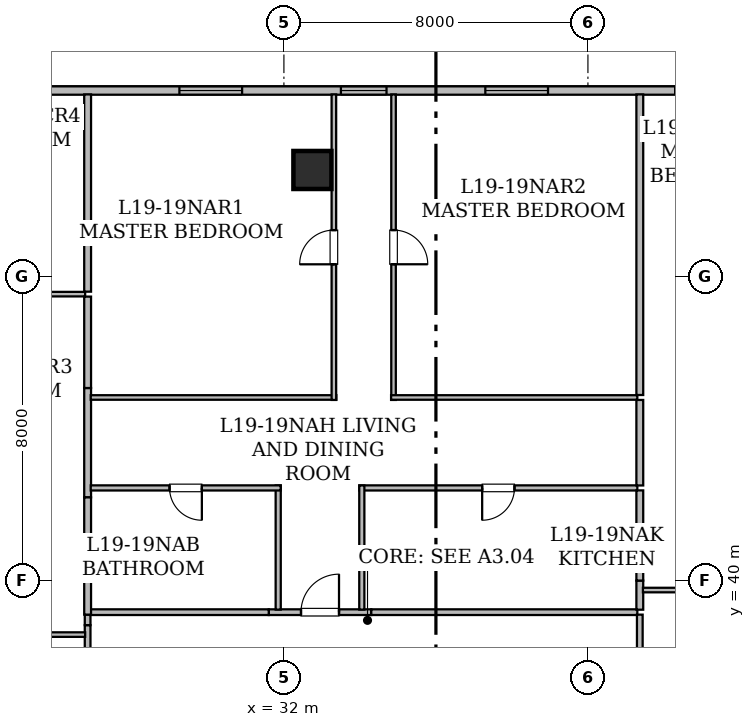
"""IFC4 building model, lengths in metres.
Left out: names, types, materials, properties, quantities, classifications, styles, units other than length and angle.
Written with IfcOpenShell. Run it as: python <this file> out.ifc"""

import sys

from ifc_helpers import new_model, si_unit, direction, frame, frame_2d, origin, origin_2d, place, context, subcontext, project, spatial, rectangle, hollow_rectangle, extrude, element, fill, save


model = new_model("IFC4")
c1 = context("Model", 3, precision=1e-05, world=origin(), true_north=direction((0.0, 1.0)))
c2 = subcontext(c1, "Body", "Model", "MODEL_VIEW")
j1 = project(units=[si_unit("LENGTHUNIT", "METRE"), si_unit("PLANEANGLEUNIT", "RADIAN")], contexts=[c1])
p1 = place(None, origin())
s1 = spatial("IfcSite", under=j1, at=p1, CompositionType="ELEMENT")
p2 = place(p1, origin())
s2 = spatial("IfcBuilding", under=s1, at=p2, CompositionType="ELEMENT")
p3 = place(p2, frame((0.0, 0.0, 77.1)))
s3 = spatial("IfcBuildingStorey", under=s2, at=p3, CompositionType="ELEMENT", Elevation=77.1)
p4 = place(p3, frame((32.75, 50.8, 0.0), z_axis=(0.0, 0.0, 1.0), x_axis=(1.0, 0.0, 0.0)))
e1 = element("IfcColumn", 1, at=p4, inside=s3, PredefinedType="COLUMN", context=c2, shape_type="SweptSolid", body=[
    extrude(hollow_rectangle(XDim=1.0, YDim=1.0, WallThickness=0.05, at=origin_2d()), origin(), (0.0, 0.0, 1.0), 3.65),
])
p5 = place(p3, frame((8.315, 52.89, 0.0), z_axis=(0.0, 0.0, 1.0), x_axis=(1.0, 0.0, 0.0)))
e2 = element("IfcWall", 2, at=p5, inside=s3, PredefinedType="STANDARD", context=c2, shape_type="SweptSolid", body=[
    extrude(rectangle(XDim=37.439, YDim=0.22, at=frame_2d((18.719, 0.0))), origin(), (0.0, 0.0, 1.0), 3.43),
])
p6 = place(p5, frame((5.093, 0.0, 0.85)))
e3 = element("IfcOpeningElement", 3, at=p6, cuts=e2, PredefinedType="OPENING", context=c2, shape_type="SweptSolid", body=[
    extrude(rectangle(XDim=1.65, YDim=1.55, at=frame_2d((0.825, 0.775))), frame((0.0, 0.12, 0.0), z_axis=(0.0, -1.0, 0.0), x_axis=(1.0, 0.0, 0.0)), (0.0, 0.0, 1.0), 0.24),
])
p7 = place(p5, frame((13.055, 0.0, 0.8)))
e4 = element("IfcOpeningElement", 4, at=p7, cuts=e2, PredefinedType="OPENING", context=c2, shape_type="SweptSolid", body=[
    extrude(rectangle(XDim=1.2, YDim=1.5, at=frame_2d((0.6, 0.75))), frame((0.0, 0.12, 0.0), z_axis=(0.0, -1.0, 0.0), x_axis=(1.0, 0.0, 0.0)), (0.0, 0.0, 1.0), 0.24),
])
p8 = place(p5, frame((10.005, 0.0, 0.85)))
e5 = element("IfcOpeningElement", 5, at=p8, cuts=e2, PredefinedType="OPENING", context=c2, shape_type="SweptSolid", body=[
    extrude(rectangle(XDim=1.65, YDim=1.55, at=frame_2d((0.825, 0.775))), frame((0.0, 0.12, 0.0), z_axis=(0.0, -1.0, 0.0), x_axis=(1.0, 0.0, 0.0)), (0.0, 0.0, 1.0), 0.24),
])
p9 = place(p5, frame((15.655, 0.0, 0.85)))
e6 = element("IfcOpeningElement", 6, at=p9, cuts=e2, PredefinedType="OPENING", context=c2, shape_type="SweptSolid", body=[
    extrude(rectangle(XDim=1.65, YDim=1.55, at=frame_2d((0.825, 0.775))), frame((0.0, 0.12, 0.0), z_axis=(0.0, -1.0, 0.0), x_axis=(1.0, 0.0, 0.0)), (0.0, 0.0, 1.0), 0.24),
])
p10 = place(p5, frame((25.185, 0.0, 0.8)))
e7 = element("IfcOpeningElement", 7, at=p10, cuts=e2, PredefinedType="OPENING", context=c2, shape_type="SweptSolid", body=[
    extrude(rectangle(XDim=1.2, YDim=1.5, at=frame_2d((0.6, 0.75))), frame((0.0, 0.12, 0.0), z_axis=(0.0, -1.0, 0.0), x_axis=(1.0, 0.0, 0.0)), (0.0, 0.0, 1.0), 0.24),
])
p11 = place(p5, frame((20.935, 0.0, 0.85)))
e8 = element("IfcOpeningElement", 8, at=p11, cuts=e2, PredefinedType="OPENING", context=c2, shape_type="SweptSolid", body=[
    extrude(rectangle(XDim=1.65, YDim=1.55, at=frame_2d((0.825, 0.775))), frame((0.0, 0.12, 0.0), z_axis=(0.0, -1.0, 0.0), x_axis=(1.0, 0.0, 0.0)), (0.0, 0.0, 1.0), 0.24),
])
p12 = place(p5, frame((28.985, 0.0, 0.85)))
e9 = element("IfcOpeningElement", 9, at=p12, cuts=e2, PredefinedType="OPENING", context=c2, shape_type="SweptSolid", body=[
    extrude(rectangle(XDim=1.65, YDim=1.55, at=frame_2d((0.825, 0.775))), frame((0.0, 0.12, 0.0), z_axis=(0.0, -1.0, 0.0), x_axis=(1.0, 0.0, 0.0)), (0.0, 0.0, 1.0), 0.24),
])
p13 = place(p5, frame((33.98, 0.0, 0.85)))
e10 = element("IfcOpeningElement", 10, at=p13, cuts=e2, PredefinedType="OPENING", context=c2, shape_type="SweptSolid", body=[
    extrude(rectangle(XDim=1.65, YDim=1.55, at=frame_2d((0.825, 0.775))), frame((0.0, 0.12, 0.0), z_axis=(0.0, -1.0, 0.0), x_axis=(1.0, 0.0, 0.0)), (0.0, 0.0, 1.0), 0.24),
])
p14 = place(p3, frame((26.835, 35.946, 0.0), z_axis=(0.0, 0.0, 1.0), x_axis=(0.0, 1.0, 0.0)))
e11 = element("IfcWall", 11, at=p14, inside=s3, PredefinedType="STANDARD", context=c2, shape_type="SweptSolid", body=[
    extrude(rectangle(XDim=2.878, YDim=0.15, at=frame_2d((1.439, 0.0))), origin(), (0.0, 0.0, 1.0), 2.647),
])
p15 = place(p14, frame((0.939, 0.0, 0.0)))
e12 = element("IfcOpeningElement", 12, at=p15, cuts=e11, PredefinedType="OPENING", context=c2, shape_type="SweptSolid", body=[
    extrude(rectangle(XDim=1.0, YDim=2.15, at=frame_2d((0.5, 1.075))), frame((0.0, 0.085, 0.0), z_axis=(0.0, -1.0, 0.0), x_axis=(1.0, 0.0, 0.0)), (0.0, 0.0, 1.0), 0.17),
])
p16 = place(p3, frame((26.835, 38.824, 0.0), z_axis=(0.0, 0.0, 1.0), x_axis=(0.0, 1.0, 0.0)))
e13 = element("IfcWall", 13, at=p16, inside=s3, PredefinedType="STANDARD", context=c2, shape_type="SweptSolid", body=[
    extrude(rectangle(XDim=0.276, YDim=0.15, at=frame_2d((0.138, 0.0))), origin(), (0.0, 0.0, 1.0), 3.43),
])
p17 = place(p3, frame((31.601, 39.165, 0.0), z_axis=(0.0, 0.0, 1.0), x_axis=(1.0, 0.0, 0.0)))
e14 = element("IfcWall", 14, at=p17, inside=s3, PredefinedType="STANDARD", context=c2, shape_type="SweptSolid", body=[
    extrude(rectangle(XDim=2.698, YDim=0.15, at=frame_2d((1.349, 0.0))), origin(), (0.0, 0.0, 1.0), 3.43),
])
p18 = place(p17, frame((0.849, 0.0, 0.0)))
e15 = element("IfcOpeningElement", 15, at=p18, cuts=e14, PredefinedType="OPENING", context=c2, shape_type="SweptSolid", body=[
    extrude(rectangle(XDim=1.0, YDim=2.15, at=frame_2d((0.5, 1.075))), frame((0.0, 0.085, 0.0), z_axis=(0.0, -1.0, 0.0), x_axis=(1.0, 0.0, 0.0)), (0.0, 0.0, 1.0), 0.17),
])
p19 = place(p3, frame((26.9, 39.165, 0.0), z_axis=(0.0, 0.0, 1.0), x_axis=(1.0, 0.0, 0.0)))
e16 = element("IfcWall", 16, at=p19, inside=s3, PredefinedType="STANDARD", context=c2, shape_type="SweptSolid", body=[
    extrude(rectangle(XDim=4.701, YDim=0.15, at=frame_2d((2.351, 0.0))), origin(), (0.0, 0.0, 1.0), 2.647),
])
p20 = place(p3, frame((34.299, 39.165, 0.0), z_axis=(0.0, 0.0, 1.0), x_axis=(1.0, 0.0, 0.0)))
e17 = element("IfcWall", 17, at=p20, inside=s3, PredefinedType="STANDARD", context=c2, shape_type="SweptSolid", body=[
    extrude(rectangle(XDim=7.001, YDim=0.15, at=frame_2d((3.5, 0.0))), origin(), (0.0, 0.0, 1.0), 3.43),
])
p21 = place(p3, frame((41.365, 39.1, 0.0), z_axis=(0.0, 0.0, 1.0), x_axis=(0.0, -1.0, 0.0)))
e18 = element("IfcWall", 18, at=p21, inside=s3, PredefinedType="STANDARD", context=c2, shape_type="SweptSolid", body=[
    extrude(rectangle(XDim=1.982, YDim=0.15, at=frame_2d((0.991, 0.0))), origin(), (0.0, 0.0, 1.0), 2.647),
])
p22 = place(p3, frame((22.69, 38.575, 0.0), z_axis=(0.0, 0.0, 1.0), x_axis=(1.0, 0.0, 0.0)))
e19 = element("IfcWall", 19, at=p22, inside=s3, PredefinedType="PARTITIONING", context=c2, shape_type="SweptSolid", body=[
    extrude(rectangle(XDim=4.08, YDim=0.12, at=frame_2d((2.04, 0.0))), origin(), (0.0, 0.0, 1.0), 3.43),
])
p23 = place(p3, frame((22.809, 47.533, 0.0), z_axis=(0.0, 0.0, 1.0), x_axis=(1.0, 0.0, 0.0)))
e20 = element("IfcWall", 20, at=p23, inside=s3, PredefinedType="PARTITIONING", context=c2, shape_type="SweptSolid", body=[
    extrude(rectangle(XDim=3.961, YDim=0.12, at=frame_2d((1.98, 0.0))), origin(), (0.0, 0.0, 1.0), 3.43),
])
p24 = place(p3, frame((26.835, 45.063, 0.0), z_axis=(0.0, 0.0, 1.0), x_axis=(0.0, -1.0, 0.0)))
e21 = element("IfcWall", 21, at=p24, inside=s3, PredefinedType="STANDARD", context=c2, shape_type="SweptSolid", body=[
    extrude(rectangle(XDim=2.878, YDim=0.18, at=frame_2d((1.439, 0.0))), origin(), (0.0, 0.0, 1.0), 2.961),
])
p25 = place(p3, frame((26.835, 42.185, 0.0), z_axis=(0.0, 0.0, 1.0), x_axis=(0.0, -1.0, 0.0)))
e22 = element("IfcWall", 22, at=p25, inside=s3, PredefinedType="STANDARD", context=c2, shape_type="SweptSolid", body=[
    extrude(rectangle(XDim=3.085, YDim=0.18, at=frame_2d((1.542, 0.0))), origin(), (0.0, 0.0, 1.0), 3.43),
])
p26 = place(p3, frame((26.835, 47.468, 0.0), z_axis=(0.0, 0.0, 1.0), x_axis=(0.0, -1.0, 0.0)))
e23 = element("IfcWall", 23, at=p26, inside=s3, PredefinedType="STANDARD", context=c2, shape_type="SweptSolid", body=[
    extrude(rectangle(XDim=2.405, YDim=0.18, at=frame_2d((1.203, 0.0))), origin(), (0.0, 0.0, 1.0), 3.43),
])
p27 = place(p3, frame((26.835, 52.788, 0.0), z_axis=(0.0, 0.0, 1.0), x_axis=(0.0, -1.0, 0.0)))
e24 = element("IfcWall", 24, at=p27, inside=s3, PredefinedType="STANDARD", context=c2, shape_type="SweptSolid", body=[
    extrude(rectangle(XDim=5.19, YDim=0.18, at=frame_2d((2.595, 0.0))), origin(), (0.0, 0.0, 1.0), 2.803),
])
p28 = place(p3, frame((31.85, 39.232, 0.0), z_axis=(0.0, 0.0, 1.0), x_axis=(0.0, 1.0, 0.0)))
e25 = element("IfcWall", 25, at=p28, inside=s3, PredefinedType="PARTITIONING", context=c2, shape_type="SweptSolid", body=[
    extrude(rectangle(XDim=3.267, YDim=0.135, at=frame_2d((1.634, 0.0))), origin(), (0.0, 0.0, 1.0), 3.43),
])
p29 = place(p3, frame((31.915, 42.434, 0.0), z_axis=(0.0, 0.0, 1.0), x_axis=(-1.0, 0.0, 0.0)))
e26 = element("IfcWall", 26, at=p29, inside=s3, PredefinedType="PARTITIONING", context=c2, shape_type="SweptSolid", body=[
    extrude(rectangle(XDim=4.998, YDim=0.135, at=frame_2d((2.499, 0.0))), origin(), (0.0, 0.0, 1.0), 2.647),
])
p30 = place(p29, frame((2.074, 0.0, 0.0)))
e27 = element("IfcOpeningElement", 27, at=p30, cuts=e26, PredefinedType="OPENING", context=c2, shape_type="SweptSolid", body=[
    extrude(rectangle(XDim=0.85, YDim=2.1, at=frame_2d((0.425, 1.05))), frame((0.0, 0.077, 0.0), z_axis=(0.0, -1.0, 0.0), x_axis=(1.0, 0.0, 0.0)), (0.0, 0.0, 1.0), 0.155),
])
p31 = place(p3, frame((41.3, 42.434, 0.0), z_axis=(0.0, 0.0, 1.0), x_axis=(-1.0, 0.0, 0.0)))
e28 = element("IfcWall", 28, at=p31, inside=s3, PredefinedType="PARTITIONING", context=c2, shape_type="SweptSolid", body=[
    extrude(rectangle(XDim=7.315, YDim=0.135, at=frame_2d((3.657, 0.0))), origin(), (0.0, 0.0, 1.0), 2.961),
])
p32 = place(p31, frame((3.233, 0.0, 0.0)))
e29 = element("IfcOpeningElement", 29, at=p32, cuts=e28, PredefinedType="OPENING", context=c2, shape_type="SweptSolid", body=[
    extrude(rectangle(XDim=0.85, YDim=2.1, at=frame_2d((0.425, 1.05))), frame((0.0, 0.077, 0.0), z_axis=(0.0, -1.0, 0.0), x_axis=(1.0, 0.0, 0.0)), (0.0, 0.0, 1.0), 0.155),
])
p33 = place(p3, frame((34.05, 42.499, 0.0), z_axis=(0.0, 0.0, 1.0), x_axis=(0.0, -1.0, 0.0)))
e30 = element("IfcWall", 30, at=p33, inside=s3, PredefinedType="PARTITIONING", context=c2, shape_type="SweptSolid", body=[
    extrude(rectangle(XDim=3.267, YDim=0.135, at=frame_2d((1.634, 0.0))), origin(), (0.0, 0.0, 1.0), 3.43),
])
p34 = place(p3, frame((26.917, 44.814, 0.0), z_axis=(0.0, 0.0, 1.0), x_axis=(1.0, 0.0, 0.0)))
e31 = element("IfcWall", 31, at=p34, inside=s3, PredefinedType="PARTITIONING", context=c2, shape_type="SweptSolid", body=[
    extrude(rectangle(XDim=6.463, YDim=0.12, at=frame_2d((3.231, 0.0))), origin(), (0.0, 0.0, 1.0), 2.647),
])
p35 = place(p3, frame((33.315, 44.749, 0.0), z_axis=(0.0, 0.0, 1.0), x_axis=(0.0, 1.0, 0.0)))
e32 = element("IfcWall", 32, at=p35, inside=s3, PredefinedType="PARTITIONING", context=c2, shape_type="SweptSolid", body=[
    extrude(rectangle(XDim=8.039, YDim=0.12, at=frame_2d((4.02, 0.0))), origin(), (0.0, 0.0, 1.0), 2.803),
])
p36 = place(p35, frame((3.569, 0.0, 0.0)))
e33 = element("IfcOpeningElement", 33, at=p36, cuts=e32, PredefinedType="OPENING", context=c2, shape_type="SweptSolid", body=[
    extrude(rectangle(XDim=0.9, YDim=2.1, at=frame_2d((0.45, 1.05))), frame((0.0, 0.07, 0.0), z_axis=(0.0, -1.0, 0.0), x_axis=(1.0, 0.0, 0.0)), (0.0, 0.0, 1.0), 0.14),
])
p37 = place(p3, frame((34.885, 52.788, 0.0), z_axis=(0.0, 0.0, 1.0), x_axis=(0.0, -1.0, 0.0)))
e34 = element("IfcWall", 34, at=p37, inside=s3, PredefinedType="PARTITIONING", context=c2, shape_type="SweptSolid", body=[
    extrude(rectangle(XDim=8.039, YDim=0.12, at=frame_2d((4.02, 0.0))), origin(), (0.0, 0.0, 1.0), 2.803),
])
p38 = place(p37, frame((3.569, 0.0, 0.0)))
e35 = element("IfcOpeningElement", 35, at=p38, cuts=e34, PredefinedType="OPENING", context=c2, shape_type="SweptSolid", body=[
    extrude(rectangle(XDim=0.9, YDim=2.1, at=frame_2d((0.45, 1.05))), frame((0.0, 0.07, 0.0), z_axis=(0.0, -1.0, 0.0), x_axis=(1.0, 0.0, 0.0)), (0.0, 0.0, 1.0), 0.14),
])
p39 = place(p3, frame((34.82, 44.814, 0.0), z_axis=(0.0, 0.0, 1.0), x_axis=(1.0, 0.0, 0.0)))
e36 = element("IfcWall", 36, at=p39, inside=s3, PredefinedType="PARTITIONING", context=c2, shape_type="SweptSolid", body=[
    extrude(rectangle(XDim=6.48, YDim=0.12, at=frame_2d((3.24, 0.0))), origin(), (0.0, 0.0, 1.0), 3.43),
])
p40 = place(p3, frame((41.365, 44.749, 0.0), z_axis=(0.0, 0.0, 1.0), x_axis=(0.0, -1.0, 0.0)))
e37 = element("IfcWall", 37, at=p40, inside=s3, PredefinedType="STANDARD", context=c2, shape_type="SweptSolid", body=[
    extrude(rectangle(XDim=2.25, YDim=0.18, at=frame_2d((1.125, 0.0))), origin(), (0.0, 0.0, 1.0), 2.961),
])
p41 = place(p3, frame((41.365, 39.996, 0.0), z_axis=(0.0, 0.0, 1.0), x_axis=(0.0, -1.0, 0.0)))
e38 = element("IfcWall", 38, at=p41, inside=s3, PredefinedType="STANDARD", context=c2, shape_type="SweptSolid", body=[
    extrude(rectangle(XDim=0.766, YDim=0.18, at=frame_2d((0.383, 0.0))), origin(), (0.0, 0.0, 1.0), 3.43),
])
p42 = place(p3, frame((41.365, 42.369, 0.0), z_axis=(0.0, 0.0, 1.0), x_axis=(0.0, -1.0, 0.0)))
e39 = element("IfcWall", 39, at=p42, inside=s3, PredefinedType="STANDARD", context=c2, shape_type="SweptSolid", body=[
    extrude(rectangle(XDim=2.373, YDim=0.18, at=frame_2d((1.187, 0.0))), origin(), (0.0, 0.0, 1.0), 3.43),
])
p43 = place(p3, frame((41.365, 52.788, 0.0), z_axis=(0.0, 0.0, 1.0), x_axis=(0.0, -1.0, 0.0)))
e40 = element("IfcWall", 40, at=p43, inside=s3, PredefinedType="STANDARD", context=c2, shape_type="SweptSolid", body=[
    extrude(rectangle(XDim=7.909, YDim=0.18, at=frame_2d((3.955, 0.0))), origin(), (0.0, 0.0, 1.0), 2.803),
])
p44 = place(p3, frame((41.447, 39.747, 0.0), z_axis=(0.0, 0.0, 1.0), x_axis=(1.0, 0.0, 0.0)))
e41 = element("IfcWall", 41, at=p44, inside=s3, PredefinedType="PARTITIONING", context=c2, shape_type="SweptSolid", body=[
    extrude(rectangle(XDim=3.493, YDim=0.12, at=frame_2d((1.747, 0.0))), origin(), (0.0, 0.0, 1.0), 2.647),
])
p45 = place(p10, origin())
e42 = element("IfcWindow", 42, at=p45, inside=s3, PartitioningType="SINGLE_PANEL", PredefinedType="WINDOW", context=c2, shape_type="SweptSolid", body=[
    extrude(rectangle(XDim=1.2, YDim=1.5, at=frame_2d((0.6, 0.75))), frame((0.0, 0.03, 0.0), z_axis=(0.0, -1.0, 0.0), x_axis=(1.0, 0.0, 0.0)), (0.0, 0.0, 1.0), 0.06),
])
fill(e7, e42)
p46 = place(p11, origin())
e43 = element("IfcWindow", 43, at=p46, inside=s3, PartitioningType="SINGLE_PANEL", PredefinedType="WINDOW", context=c2, shape_type="SweptSolid", body=[
    extrude(rectangle(XDim=1.65, YDim=1.55, at=frame_2d((0.825, 0.775))), frame((0.0, 0.03, 0.0), z_axis=(0.0, -1.0, 0.0), x_axis=(1.0, 0.0, 0.0)), (0.0, 0.0, 1.0), 0.06),
])
fill(e8, e43)
p47 = place(p12, origin())
e44 = element("IfcWindow", 44, at=p47, inside=s3, PartitioningType="SINGLE_PANEL", PredefinedType="WINDOW", context=c2, shape_type="SweptSolid", body=[
    extrude(rectangle(XDim=1.65, YDim=1.55, at=frame_2d((0.825, 0.775))), frame((0.0, 0.03, 0.0), z_axis=(0.0, -1.0, 0.0), x_axis=(1.0, 0.0, 0.0)), (0.0, 0.0, 1.0), 0.06),
])
fill(e9, e44)
p48 = place(p13, origin())
e45 = element("IfcWindow", 45, at=p48, inside=s3, PartitioningType="SINGLE_PANEL", PredefinedType="WINDOW", context=c2, shape_type="SweptSolid", body=[
    extrude(rectangle(XDim=1.65, YDim=1.55, at=frame_2d((0.825, 0.775))), frame((0.0, 0.03, 0.0), z_axis=(0.0, -1.0, 0.0), x_axis=(1.0, 0.0, 0.0)), (0.0, 0.0, 1.0), 0.06),
])
fill(e10, e45)
p49 = place(p18, origin())
e46 = element("IfcDoor", 46, at=p49, inside=s3, OperationType="SINGLE_SWING_RIGHT", PredefinedType="DOOR", context=c2, shape_type="SweptSolid", body=[
    extrude(rectangle(XDim=1.0, YDim=2.15, at=frame_2d((0.5, 1.075))), frame((0.0, 0.025, 0.0), z_axis=(0.0, -1.0, 0.0), x_axis=(1.0, 0.0, 0.0)), (0.0, 0.0, 1.0), 0.05),
])
fill(e15, e46)
p50 = place(p30, origin())
e47 = element("IfcDoor", 47, at=p50, inside=s3, OperationType="SINGLE_SWING_LEFT", PredefinedType="DOOR", context=c2, shape_type="SweptSolid", body=[
    extrude(rectangle(XDim=0.85, YDim=2.1, at=frame_2d((0.425, 1.05))), frame((0.0, 0.025, 0.0), z_axis=(0.0, -1.0, 0.0), x_axis=(1.0, 0.0, 0.0)), (0.0, 0.0, 1.0), 0.05),
])
fill(e27, e47)
p51 = place(p32, origin())
e48 = element("IfcDoor", 48, at=p51, inside=s3, OperationType="SINGLE_SWING_RIGHT", PredefinedType="DOOR", context=c2, shape_type="SweptSolid", body=[
    extrude(rectangle(XDim=0.85, YDim=2.1, at=frame_2d((0.425, 1.05))), frame((0.0, 0.025, 0.0), z_axis=(0.0, -1.0, 0.0), x_axis=(1.0, 0.0, 0.0)), (0.0, 0.0, 1.0), 0.05),
])
fill(e29, e48)
p52 = place(p36, origin())
e49 = element("IfcDoor", 49, at=p52, inside=s3, OperationType="SINGLE_SWING_LEFT", PredefinedType="DOOR", context=c2, shape_type="SweptSolid", body=[
    extrude(rectangle(XDim=0.9, YDim=2.1, at=frame_2d((0.45, 1.05))), frame((0.0, 0.025, 0.0), z_axis=(0.0, -1.0, 0.0), x_axis=(1.0, 0.0, 0.0)), (0.0, 0.0, 1.0), 0.05),
])
fill(e33, e49)
p53 = place(p38, origin())
e50 = element("IfcDoor", 50, at=p53, inside=s3, OperationType="SINGLE_SWING_RIGHT", PredefinedType="DOOR", context=c2, shape_type="SweptSolid", body=[
    extrude(rectangle(XDim=0.9, YDim=2.1, at=frame_2d((0.45, 1.05))), frame((0.0, 0.025, 0.0), z_axis=(0.0, -1.0, 0.0), x_axis=(1.0, 0.0, 0.0)), (0.0, 0.0, 1.0), 0.05),
])
fill(e35, e50)
save(model, sys.argv[1])
